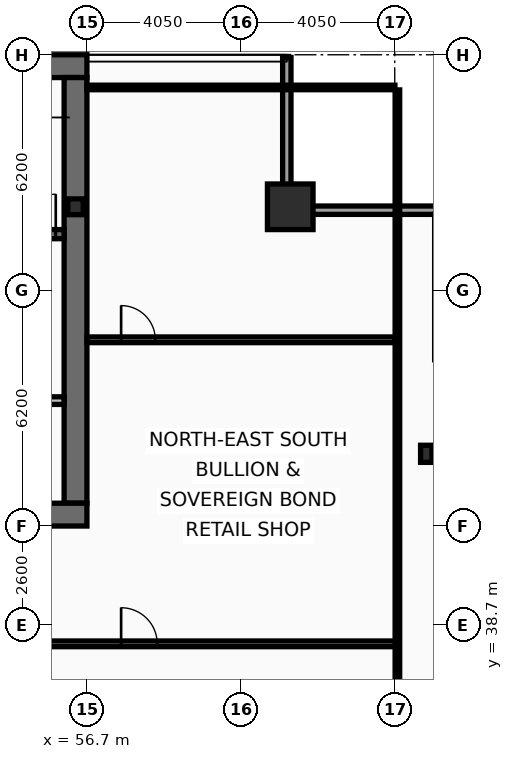
"""IFC4 building model, lengths in metres.
Left out: names, types, materials, properties, quantities, classifications, styles, units other than length and angle.
Written with IfcOpenShell. Run it as: python <this file> out.ifc"""

import sys

from ifc_helpers import new_model, si_unit, direction, frame, frame_2d, origin, origin_2d, place, context, subcontext, project, spatial, rectangle, hollow_rectangle, i_section, extrude, element, fill, save


model = new_model("IFC4")
c1 = context("Model", 3, precision=1e-05, world=origin(), true_north=direction((0.0, 1.0)))
c2 = subcontext(c1, "Body", "Model", "MODEL_VIEW")
j1 = project(units=[si_unit("LENGTHUNIT", "METRE"), si_unit("PLANEANGLEUNIT", "RADIAN")], contexts=[c1])
p1 = place(None, origin())
s1 = spatial("IfcSite", under=j1, at=p1, CompositionType="ELEMENT")
p2 = place(p1, origin())
s2 = spatial("IfcBuilding", under=s1, at=p2, CompositionType="ELEMENT")
p3 = place(p2, frame((0.0, 0.0, 192.2)))
s3 = spatial("IfcBuildingStorey", under=s2, at=p3, CompositionType="ELEMENT", Elevation=192.2)
p4 = place(p3, frame((16.2, 53.4, 0.0), z_axis=(0.0, 0.0, 1.0), x_axis=(1.0, 0.0, 0.0)))
e1 = element("IfcWall", 1, at=p4, inside=s3, PredefinedType="SHEAR", context=c2, shape_type="SweptSolid", body=[
    extrude(rectangle(XDim=40.5, YDim=0.6, at=frame_2d((20.25, 0.0))), origin(), (0.0, 0.0, 1.0), 3.44),
])
p5 = place(p3, frame((56.4, 53.1, 0.0), z_axis=(0.0, 0.0, 1.0), x_axis=(0.0, -1.0, 0.0)))
e2 = element("IfcWall", 2, at=p5, inside=s3, PredefinedType="SHEAR", context=c2, shape_type="SweptSolid", body=[
    extrude(rectangle(XDim=11.2, YDim=0.6, at=frame_2d((5.6, 0.0))), origin(), (0.0, 0.0, 1.0), 3.44),
])
p6 = place(p3, frame((56.7, 41.6, 0.0), z_axis=(0.0, 0.0, 1.0), x_axis=(-1.0, 0.0, 0.0)))
e3 = element("IfcWall", 3, at=p6, inside=s3, PredefinedType="SHEAR", context=c2, shape_type="SweptSolid", body=[
    extrude(rectangle(XDim=2.45, YDim=0.6, at=frame_2d((1.225, 0.0))), origin(), (0.0, 0.0, 1.0), 3.44),
])
p7 = place(p3, frame((48.63, 48.98, 0.0), z_axis=(0.0, 0.0, 1.0), x_axis=(1.0, 0.0, 0.0)))
e4 = element("IfcWall", 4, at=p7, inside=s3, PredefinedType="SHEAR", context=c2, shape_type="SweptSolid", body=[
    extrude(rectangle(XDim=7.47, YDim=0.24, at=frame_2d((3.735, 0.0))), origin(), (0.0, 0.0, 1.0), 3.44),
])
p8 = place(p7, frame((6.2, 0.0, 0.0)))
e5 = element("IfcOpeningElement", 5, at=p8, cuts=e4, PredefinedType="OPENING", context=c2, shape_type="SweptSolid", body=[
    extrude(rectangle(XDim=1.05, YDim=2.15, at=frame_2d((0.525, 1.075))), frame((0.0, 0.13, 0.0), z_axis=(0.0, -1.0, 0.0), x_axis=(1.0, 0.0, 0.0)), (0.0, 0.0, 1.0), 0.26),
])
p9 = place(p3, frame((62.05, 49.7, 0.0), z_axis=(0.0, 0.0, 1.0), x_axis=(1.0, 0.0, 0.0)))
e6 = element("IfcColumn", 6, at=p9, inside=s3, PredefinedType="COLUMN", context=c2, shape_type="SweptSolid", body=[
    extrude(hollow_rectangle(XDim=1.2, YDim=1.2, WallThickness=0.06, at=origin_2d()), origin(), (0.0, 0.0, 1.0), 3.6),
])
p10 = place(p3, frame((65.63, 43.2, 0.0), z_axis=(0.0, 0.0, 1.0), x_axis=(1.0, 0.0, 0.0)))
e7 = element("IfcColumn", 7, at=p10, inside=s3, PredefinedType="COLUMN", context=c2, shape_type="SweptSolid", body=[
    extrude(i_section(OverallWidth=0.3, OverallDepth=0.45, WebThickness=0.014, FlangeThickness=0.026, at=origin_2d()), origin(), (0.0, 0.0, 1.0), 3.6),
])
p11 = place(p3, frame((56.4, 49.7, 0.0), z_axis=(0.0, 0.0, 1.0), x_axis=(1.0, 0.0, 0.0)))
e8 = element("IfcColumn", 8, at=p11, inside=s3, PredefinedType="COLUMN", context=c2, shape_type="SweptSolid", body=[
    extrude(i_section(OverallWidth=0.406, OverallDepth=0.416, WebThickness=0.03, FlangeThickness=0.048, at=origin_2d()), origin(), (0.0, 0.0, 1.0), 3.6),
])
p12 = place(p3, frame((61.96, 53.63, 0.0), z_axis=(0.0, 0.0, 1.0), x_axis=(0.0, -1.0, 0.0)))
e9 = element("IfcWall", 9, at=p12, inside=s3, PredefinedType="SOLIDWALL", context=c2, shape_type="SweptSolid", body=[
    extrude(rectangle(XDim=3.91, YDim=0.22, at=frame_2d((1.955, 0.0))), origin(), (0.0, 0.0, 1.0), 2.83),
])
p13 = place(p3, frame((61.85, 49.61, 0.0), z_axis=(0.0, 0.0, 1.0), x_axis=(1.0, 0.0, 0.0)))
e10 = element("IfcWall", 10, at=p13, inside=s3, PredefinedType="SOLIDWALL", context=c2, shape_type="SweptSolid", body=[
    extrude(rectangle(XDim=4.22, YDim=0.22, at=frame_2d((2.11, 0.0))), origin(), (0.0, 0.0, 1.0), 2.83),
])
p14 = place(p3, frame((51.9, 44.6, 0.0), z_axis=(0.0, 0.0, 1.0), x_axis=(1.0, 0.0, 0.0)))
e11 = element("IfcWall", 11, at=p14, inside=s3, PredefinedType="PARTITIONING", context=c2, shape_type="SweptSolid", body=[
    extrude(rectangle(XDim=4.2, YDim=0.2, at=frame_2d((2.1, 0.0))), origin(), (0.0, 0.0, 1.0), 3.44),
])
p15 = place(p14, frame((1.15, 0.0, 0.0)))
e12 = element("IfcOpeningElement", 12, at=p15, cuts=e11, PredefinedType="OPENING", context=c2, shape_type="SweptSolid", body=[
    extrude(rectangle(XDim=1.05, YDim=2.15, at=frame_2d((0.525, 1.075))), frame((0.0, 0.11, 0.0), z_axis=(0.0, -1.0, 0.0), x_axis=(1.0, 0.0, 0.0)), (0.0, 0.0, 1.0), 0.22),
])
p16 = place(p3, frame((54.35, 38.2, 0.0), z_axis=(0.0, 0.0, 1.0), x_axis=(1.0, 0.0, 0.0)))
e13 = element("IfcWall", 13, at=p16, inside=s3, PredefinedType="PARTITIONING", context=c2, shape_type="SweptSolid", body=[
    extrude(rectangle(XDim=10.52, YDim=0.15, at=frame_2d((5.26, 0.0))), origin(), (0.0, 0.0, 1.0), 2.73),
])
p17 = place(p16, frame((3.25, 0.0, 0.0)))
e14 = element("IfcOpeningElement", 14, at=p17, cuts=e13, PredefinedType="OPENING", context=c2, shape_type="SweptSolid", body=[
    extrude(rectangle(XDim=0.95, YDim=2.05, at=frame_2d((0.475, 1.025))), frame((0.0, 0.085, 0.0), z_axis=(0.0, -1.0, 0.0), x_axis=(1.0, 0.0, 0.0)), (0.0, 0.0, 1.0), 0.17),
])
p18 = place(p3, frame((56.7, 46.2, 0.0), z_axis=(0.0, 0.0, 1.0), x_axis=(1.0, 0.0, 0.0)))
e15 = element("IfcWall", 15, at=p18, inside=s3, PredefinedType="PARTITIONING", context=c2, shape_type="SweptSolid", body=[
    extrude(rectangle(XDim=8.105, YDim=0.15, at=frame_2d((4.052, 0.0))), origin(), (0.0, 0.0, 1.0), 2.83),
])
p19 = place(p18, frame((0.9, 0.0, 0.0)))
e16 = element("IfcOpeningElement", 16, at=p19, cuts=e15, PredefinedType="OPENING", context=c2, shape_type="SweptSolid", body=[
    extrude(rectangle(XDim=0.9, YDim=2.05, at=frame_2d((0.45, 1.025))), frame((0.0, 0.085, 0.0), z_axis=(0.0, -1.0, 0.0), x_axis=(1.0, 0.0, 0.0)), (0.0, 0.0, 1.0), 0.17),
])
p20 = place(p3, frame((64.87, 10.665, 0.0), z_axis=(0.0, 0.0, 1.0), x_axis=(0.0, 1.0, 0.0)))
e17 = element("IfcWall", 17, at=p20, inside=s3, PredefinedType="PARTITIONING", context=c2, shape_type="SweptSolid", body=[
    extrude(rectangle(XDim=42.11, YDim=0.12, at=frame_2d((21.055, 0.0))), origin(), (0.0, 0.0, 1.0), 2.73),
])
p21 = place(p3, frame((56.7, 52.84, 0.0), z_axis=(0.0, 0.0, 1.0), x_axis=(1.0, 0.0, 0.0)))
e18 = element("IfcWall", 18, at=p21, inside=s3, PredefinedType="PARTITIONING", context=c2, shape_type="SweptSolid", body=[
    extrude(rectangle(XDim=8.105, YDim=0.12, at=frame_2d((4.052, 0.0))), origin(), (0.0, 0.0, 1.0), 3.44),
])
p22 = place(p8, origin())
e19 = element("IfcDoor", 19, at=p22, inside=s3, OperationType="SINGLE_SWING_RIGHT", PredefinedType="DOOR", context=c2, shape_type="SweptSolid", body=[
    extrude(rectangle(XDim=1.05, YDim=2.15, at=frame_2d((0.525, 1.075))), frame((0.0, 0.025, 0.0), z_axis=(0.0, -1.0, 0.0), x_axis=(1.0, 0.0, 0.0)), (0.0, 0.0, 1.0), 0.05),
])
fill(e5, e19)
p23 = place(p17, origin())
e20 = element("IfcDoor", 20, at=p23, inside=s3, OperationType="SINGLE_SWING_LEFT", PredefinedType="DOOR", context=c2, shape_type="SweptSolid", body=[
    extrude(rectangle(XDim=0.95, YDim=2.05, at=frame_2d((0.475, 1.025))), frame((0.0, 0.025, 0.0), z_axis=(0.0, -1.0, 0.0), x_axis=(1.0, 0.0, 0.0)), (0.0, 0.0, 1.0), 0.05),
])
fill(e14, e20)
p24 = place(p19, origin())
e21 = element("IfcDoor", 21, at=p24, inside=s3, OperationType="SINGLE_SWING_LEFT", PredefinedType="DOOR", context=c2, shape_type="SweptSolid", body=[
    extrude(rectangle(XDim=0.9, YDim=2.05, at=frame_2d((0.45, 1.025))), frame((0.0, 0.025, 0.0), z_axis=(0.0, -1.0, 0.0), x_axis=(1.0, 0.0, 0.0)), (0.0, 0.0, 1.0), 0.05),
])
fill(e16, e21)
save(model, sys.argv[1])
